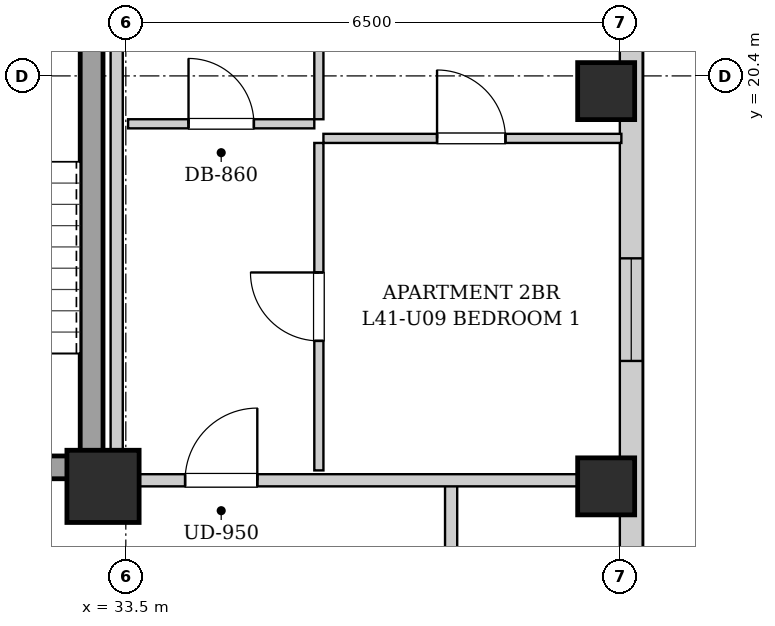
"""IFC4 building model, lengths in metres.
Left out: names, types, materials, properties, quantities, classifications, styles, units other than length and angle.
Written with IfcOpenShell. Run it as: python <this file> out.ifc"""

import sys

from ifc_helpers import new_model, si_unit, direction, frame, frame_2d, origin, origin_2d, place, context, subcontext, project, spatial, rectangle, extrude, element, fill, save


model = new_model("IFC4")
c1 = context("Model", 3, precision=1e-05, world=origin(), true_north=direction((0.0, 1.0)))
c2 = subcontext(c1, "Body", "Model", "MODEL_VIEW")
j1 = project(units=[si_unit("LENGTHUNIT", "METRE"), si_unit("PLANEANGLEUNIT", "RADIAN")], contexts=[c1])
p1 = place(None, origin())
s1 = spatial("IfcSite", under=j1, at=p1, CompositionType="ELEMENT")
p2 = place(p1, origin())
s2 = spatial("IfcBuilding", under=s1, at=p2, CompositionType="ELEMENT")
p3 = place(p2, frame((0.0, 0.0, 143.9)))
s3 = spatial("IfcBuildingStorey", under=s2, at=p3, CompositionType="ELEMENT", Elevation=143.9)
for number, where, z_axis, x_axis in (
    (1, (39.82, 15.0, 0.0), (0.0, 0.0, 1.0), (1.0, 0.0, 0.0)),
    (2, (39.82, 20.2, 0.0), (0.0, 0.0, 1.0), (1.0, 0.0, 0.0)),
):
    element("IfcColumn", number, at=place(p3, frame(where, z_axis=z_axis, x_axis=x_axis)), inside=s3, PredefinedType="COLUMN", context=c2, shape_type="SweptSolid", body=[
        extrude(rectangle(XDim=0.75, YDim=0.75, at=origin_2d()), origin(), (0.0, 0.0, 1.0), 3.25),
    ])
p4 = place(p3, frame((33.2, 15.0, 0.0), z_axis=(0.0, 0.0, 1.0), x_axis=(1.0, 0.0, 0.0)))
e3 = element("IfcColumn", 3, at=p4, inside=s3, PredefinedType="COLUMN", context=c2, shape_type="SweptSolid", body=[
    extrude(rectangle(XDim=0.95, YDim=0.95, at=origin_2d()), origin(), (0.0, 0.0, 1.0), 3.25),
])
p5 = place(p3, frame((40.15, 40.8, 0.0), z_axis=(0.0, 0.0, 1.0), x_axis=(0.0, -1.0, 0.0)))
e4 = element("IfcWall", 4, at=p5, inside=s3, PredefinedType="SOLIDWALL", context=c2, shape_type="SweptSolid", body=[
    extrude(rectangle(XDim=34.5, YDim=0.3, at=frame_2d((17.25, 0.0))), origin(), (0.0, 0.0, 1.0), 2.99),
])
p6 = place(p5, frame((31.575, 0.0, 0.55)))
e5 = element("IfcOpeningElement", 5, at=p6, cuts=e4, PredefinedType="OPENING", context=c2, shape_type="SweptSolid", body=[
    extrude(rectangle(XDim=1.35, YDim=1.2, at=frame_2d((0.675, 0.6))), frame((0.0, 0.16, 0.0), z_axis=(0.0, -1.0, 0.0), x_axis=(1.0, 0.0, 0.0)), (0.0, 0.0, 1.0), 0.32),
])
p7 = place(p5, frame((3.075, 0.0, 0.55)))
e6 = element("IfcOpeningElement", 6, at=p7, cuts=e4, PredefinedType="OPENING", context=c2, shape_type="SweptSolid", body=[
    extrude(rectangle(XDim=1.35, YDim=1.2, at=frame_2d((0.675, 0.6))), frame((0.0, 0.16, 0.0), z_axis=(0.0, -1.0, 0.0), x_axis=(1.0, 0.0, 0.0)), (0.0, 0.0, 1.0), 0.32),
])
p8 = place(p5, frame((1.085, 0.0, 0.55)))
e7 = element("IfcOpeningElement", 7, at=p8, cuts=e4, PredefinedType="OPENING", context=c2, shape_type="SweptSolid", body=[
    extrude(rectangle(XDim=1.35, YDim=1.2, at=frame_2d((0.675, 0.6))), frame((0.0, 0.16, 0.0), z_axis=(0.0, -1.0, 0.0), x_axis=(1.0, 0.0, 0.0)), (0.0, 0.0, 1.0), 0.32),
])
p9 = place(p5, frame((22.8, 0.0, 0.55)))
e8 = element("IfcOpeningElement", 8, at=p9, cuts=e4, PredefinedType="OPENING", context=c2, shape_type="SweptSolid", body=[
    extrude(rectangle(XDim=1.35, YDim=1.2, at=frame_2d((0.675, 0.6))), frame((0.0, 0.16, 0.0), z_axis=(0.0, -1.0, 0.0), x_axis=(1.0, 0.0, 0.0)), (0.0, 0.0, 1.0), 0.32),
])
p10 = place(p5, frame((13.425, 0.0, 0.55)))
e9 = element("IfcOpeningElement", 9, at=p10, cuts=e4, PredefinedType="OPENING", context=c2, shape_type="SweptSolid", body=[
    extrude(rectangle(XDim=1.35, YDim=1.2, at=frame_2d((0.675, 0.6))), frame((0.0, 0.16, 0.0), z_axis=(0.0, -1.0, 0.0), x_axis=(1.0, 0.0, 0.0)), (0.0, 0.0, 1.0), 0.32),
])
p11 = place(p3, frame((33.05, 15.1, 0.0), z_axis=(0.0, 0.0, 1.0), x_axis=(0.0, 1.0, 0.0)))
e10 = element("IfcWall", 10, at=p11, inside=s3, PredefinedType="SHEAR", context=c2, shape_type="SweptSolid", body=[
    extrude(rectangle(XDim=9.0, YDim=0.3, at=frame_2d((4.5, 0.0))), origin(), (0.0, 0.0, 1.0), 2.99),
])
p12 = place(p3, frame((30.05, 15.25, 0.0), z_axis=(0.0, 0.0, 1.0), x_axis=(1.0, 0.0, 0.0)))
e11 = element("IfcWall", 11, at=p12, inside=s3, PredefinedType="SHEAR", context=c2, shape_type="SweptSolid", body=[
    extrude(rectangle(XDim=2.85, YDim=0.3, at=frame_2d((1.425, 0.0))), origin(), (0.0, 0.0, 1.0), 2.99),
])
p13 = place(p12, frame((0.86, 0.0, 0.0)))
e12 = element("IfcOpeningElement", 12, at=p13, cuts=e11, PredefinedType="OPENING", context=c2, shape_type="SweptSolid", body=[
    extrude(rectangle(XDim=1.1, YDim=2.05, at=frame_2d((0.55, 1.025))), frame((0.0, 0.16, 0.0), z_axis=(0.0, -1.0, 0.0), x_axis=(1.0, 0.0, 0.0)), (0.0, 0.0, 1.0), 0.32),
])
p14 = place(p3, frame((37.78, 13.35, 0.0), z_axis=(0.0, 0.0, 1.0), x_axis=(0.0, 1.0, 0.0)))
e13 = element("IfcWall", 13, at=p14, inside=s3, PredefinedType="PARTITIONING", context=c2, shape_type="SweptSolid", body=[
    extrude(rectangle(XDim=1.74, YDim=0.16, at=frame_2d((0.87, 0.0))), origin(), (0.0, 0.0, 1.0), 2.99),
])
p15 = place(p3, frame((33.38, 15.08, 0.0), z_axis=(0.0, 0.0, 1.0), x_axis=(1.0, 0.0, 0.0)))
e14 = element("IfcWall", 14, at=p15, inside=s3, PredefinedType="PARTITIONING", context=c2, shape_type="SweptSolid", body=[
    extrude(rectangle(XDim=6.64, YDim=0.16, at=frame_2d((3.32, 0.0))), origin(), (0.0, 0.0, 1.0), 2.426),
])
p16 = place(p15, frame((0.9, 0.0, 0.0)))
e15 = element("IfcOpeningElement", 15, at=p16, cuts=e14, PredefinedType="OPENING", context=c2, shape_type="SweptSolid", body=[
    extrude(rectangle(XDim=0.95, YDim=2.1, at=frame_2d((0.475, 1.05))), frame((0.0, 0.09, 0.0), z_axis=(0.0, -1.0, 0.0), x_axis=(1.0, 0.0, 0.0)), (0.0, 0.0, 1.0), 0.18),
])
p17 = place(p3, frame((33.53, 19.77, 0.0), z_axis=(0.0, 0.0, 1.0), x_axis=(1.0, 0.0, 0.0)))
e16 = element("IfcWall", 16, at=p17, inside=s3, PredefinedType="PARTITIONING", context=c2, shape_type="SweptSolid", body=[
    extrude(rectangle(XDim=2.45, YDim=0.12, at=frame_2d((1.225, 0.0))), origin(), (0.0, 0.0, 1.0), 2.99),
])
p18 = place(p17, frame((0.795, 0.0, 0.0)))
e17 = element("IfcOpeningElement", 17, at=p18, cuts=e16, PredefinedType="OPENING", context=c2, shape_type="SweptSolid", body=[
    extrude(rectangle(XDim=0.86, YDim=2.05, at=frame_2d((0.43, 1.025))), frame((0.0, 0.07, 0.0), z_axis=(0.0, -1.0, 0.0), x_axis=(1.0, 0.0, 0.0)), (0.0, 0.0, 1.0), 0.14),
])
p19 = place(p3, frame((36.04, 19.83, 0.0), z_axis=(0.0, 0.0, 1.0), x_axis=(0.0, 1.0, 0.0)))
e18 = element("IfcWall", 18, at=p19, inside=s3, PredefinedType="PARTITIONING", context=c2, shape_type="SweptSolid", body=[
    extrude(rectangle(XDim=2.3, YDim=0.12, at=frame_2d((1.15, 0.0))), origin(), (0.0, 0.0, 1.0), 2.99),
])
p20 = place(p3, frame((36.04, 15.21, 0.0), z_axis=(0.0, 0.0, 1.0), x_axis=(0.0, 1.0, 0.0)))
e19 = element("IfcWall", 19, at=p20, inside=s3, PredefinedType="PARTITIONING", context=c2, shape_type="SweptSolid", body=[
    extrude(rectangle(XDim=4.308, YDim=0.12, at=frame_2d((2.154, 0.0))), origin(), (0.0, 0.0, 1.0), 2.99),
])
p21 = place(p20, frame((1.704, 0.0, 0.0)))
e20 = element("IfcOpeningElement", 20, at=p21, cuts=e19, PredefinedType="OPENING", context=c2, shape_type="SweptSolid", body=[
    extrude(rectangle(XDim=0.9, YDim=2.05, at=frame_2d((0.45, 1.025))), frame((0.0, 0.07, 0.0), z_axis=(0.0, -1.0, 0.0), x_axis=(1.0, 0.0, 0.0)), (0.0, 0.0, 1.0), 0.14),
])
p22 = place(p3, frame((36.1, 19.578, 0.0), z_axis=(0.0, 0.0, 1.0), x_axis=(1.0, 0.0, 0.0)))
e21 = element("IfcWall", 21, at=p22, inside=s3, PredefinedType="PARTITIONING", context=c2, shape_type="SweptSolid", body=[
    extrude(rectangle(XDim=3.92, YDim=0.12, at=frame_2d((1.96, 0.0))), origin(), (0.0, 0.0, 1.0), 2.99),
])
p23 = place(p22, frame((1.495, 0.0, 0.0)))
e22 = element("IfcOpeningElement", 22, at=p23, cuts=e21, PredefinedType="OPENING", context=c2, shape_type="SweptSolid", body=[
    extrude(rectangle(XDim=0.9, YDim=2.05, at=frame_2d((0.45, 1.025))), frame((0.0, 0.07, 0.0), z_axis=(0.0, -1.0, 0.0), x_axis=(1.0, 0.0, 0.0)), (0.0, 0.0, 1.0), 0.14),
])
p24 = place(p3, frame((33.38, 15.02, 0.0), z_axis=(0.0, 0.0, 1.0), x_axis=(0.0, 1.0, 0.0)))
e23 = element("IfcWall", 23, at=p24, inside=s3, PredefinedType="PARTITIONING", context=c2, shape_type="SweptSolid", body=[
    extrude(rectangle(XDim=13.98, YDim=0.16, at=frame_2d((6.99, 0.0))), origin(), (0.0, 0.0, 1.0), 2.99),
])
p25 = place(p16, origin())
e24 = element("IfcDoor", 24, at=p25, inside=s3, OperationType="SINGLE_SWING_RIGHT", PredefinedType="DOOR", context=c2, shape_type="SweptSolid", body=[
    extrude(rectangle(XDim=0.95, YDim=2.1, at=frame_2d((0.475, 1.05))), frame((0.0, 0.025, 0.0), z_axis=(0.0, -1.0, 0.0), x_axis=(1.0, 0.0, 0.0)), (0.0, 0.0, 1.0), 0.05),
])
fill(e15, e24)
p26 = place(p18, origin())
e25 = element("IfcDoor", 25, at=p26, inside=s3, OperationType="SINGLE_SWING_LEFT", PredefinedType="DOOR", context=c2, shape_type="SweptSolid", body=[
    extrude(rectangle(XDim=0.86, YDim=2.05, at=frame_2d((0.43, 1.025))), frame((0.0, 0.025, 0.0), z_axis=(0.0, -1.0, 0.0), x_axis=(1.0, 0.0, 0.0)), (0.0, 0.0, 1.0), 0.05),
])
fill(e17, e25)
p27 = place(p21, origin())
e26 = element("IfcDoor", 26, at=p27, inside=s3, OperationType="SINGLE_SWING_RIGHT", PredefinedType="DOOR", context=c2, shape_type="SweptSolid", body=[
    extrude(rectangle(XDim=0.9, YDim=2.05, at=frame_2d((0.45, 1.025))), frame((0.0, 0.025, 0.0), z_axis=(0.0, -1.0, 0.0), x_axis=(1.0, 0.0, 0.0)), (0.0, 0.0, 1.0), 0.05),
])
fill(e20, e26)
p28 = place(p23, origin())
e27 = element("IfcDoor", 27, at=p28, inside=s3, OperationType="SINGLE_SWING_LEFT", PredefinedType="DOOR", context=c2, shape_type="SweptSolid", body=[
    extrude(rectangle(XDim=0.9, YDim=2.05, at=frame_2d((0.45, 1.025))), frame((0.0, 0.025, 0.0), z_axis=(0.0, -1.0, 0.0), x_axis=(1.0, 0.0, 0.0)), (0.0, 0.0, 1.0), 0.05),
])
fill(e22, e27)
p29 = place(p9, origin())
e28 = element("IfcWindow", 28, at=p29, inside=s3, PartitioningType="SINGLE_PANEL", PredefinedType="WINDOW", context=c2, shape_type="SweptSolid", body=[
    extrude(rectangle(XDim=1.35, YDim=1.2, at=frame_2d((0.675, 0.6))), frame((0.0, 0.03, 0.0), z_axis=(0.0, -1.0, 0.0), x_axis=(1.0, 0.0, 0.0)), (0.0, 0.0, 1.0), 0.06),
])
fill(e8, e28)
save(model, sys.argv[1])
